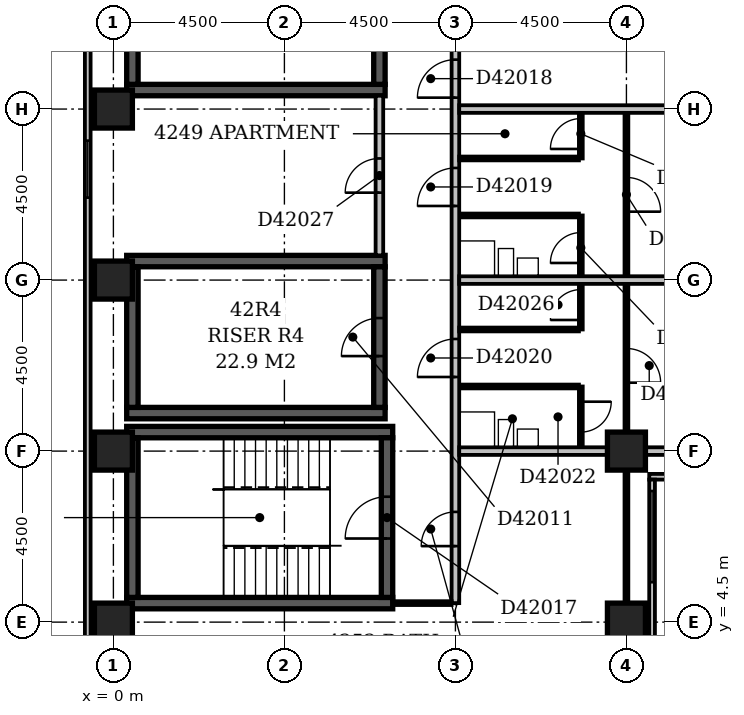
"""IFC4 building model, lengths in metres.
Left out: names, types, materials, properties, quantities, classifications, styles, units other than length and angle.
Written with IfcOpenShell. Run it as: python <this file> out.ifc"""

import sys

from ifc_helpers import new_model, si_unit, direction, frame, frame_2d, origin, origin_2d, place, context, subcontext, project, spatial, rectangle, extrude, element, fill, save


model = new_model("IFC4")
c1 = context("Model", 3, precision=1e-05, world=origin(), true_north=direction((0.0, 1.0)))
c2 = subcontext(c1, "Body", "Model", "MODEL_VIEW")
j1 = project(units=[si_unit("LENGTHUNIT", "METRE"), si_unit("PLANEANGLEUNIT", "RADIAN")], contexts=[c1])
p1 = place(None, origin())
s1 = spatial("IfcSite", under=j1, at=p1, CompositionType="ELEMENT")
p2 = place(p1, origin())
s2 = spatial("IfcBuilding", under=s1, at=p2, CompositionType="ELEMENT")
p3 = place(p2, frame((0.0, 0.0, 166.4)))
s3 = spatial("IfcBuildingStorey", under=s2, at=p3, CompositionType="ELEMENT", Elevation=166.4)
for number, where, z_axis, x_axis in (
    (1, (0.35, 5.0, -0.3), (0.0, 0.0, 1.0), (1.0, 0.0, 0.0)),
    (2, (0.35, 9.5, -0.3), (0.0, 0.0, 1.0), (1.0, 0.0, 0.0)),
):
    element("IfcWall", number, at=place(p3, frame(where, z_axis=z_axis, x_axis=x_axis)), inside=s3, PredefinedType="SHEAR", context=c2, shape_type="SweptSolid", body=[
        extrude(rectangle(XDim=7.0, YDim=0.3, at=frame_2d((3.5, 0.0))), origin(), (0.0, 0.0, 1.0), 3.6),
    ])
for number, where, z_axis, x_axis in (
    (3, (0.35, 10.0, -0.3), (0.0, 0.0, 1.0), (1.0, 0.0, 0.0)),
    (4, (0.35, 14.0, -0.3), (0.0, 0.0, 1.0), (1.0, 0.0, 0.0)),
    (5, (0.35, 18.5, -0.3), (0.0, 0.0, 1.0), (1.0, 0.0, 0.0)),
):
    element("IfcWall", number, at=place(p3, frame(where, z_axis=z_axis, x_axis=x_axis)), inside=s3, PredefinedType="SHEAR", context=c2, shape_type="SweptSolid", body=[
        extrude(rectangle(XDim=6.8, YDim=0.3, at=frame_2d((3.4, 0.0))), origin(), (0.0, 0.0, 1.0), 3.6),
    ])
p4 = place(p3, frame((0.5, 5.15, -0.3), z_axis=(0.0, 0.0, 1.0), x_axis=(0.0, 1.0, 0.0)))
e6 = element("IfcWall", 6, at=p4, inside=s3, PredefinedType="SHEAR", context=c2, shape_type="SweptSolid", body=[
    extrude(rectangle(XDim=4.2, YDim=0.3, at=frame_2d((2.1, 0.0))), origin(), (0.0, 0.0, 1.0), 3.6),
])
for number, where, z_axis, x_axis in (
    (7, (0.5, 10.15, -0.3), (0.0, 0.0, 1.0), (0.0, 1.0, 0.0)),
    (8, (0.5, 18.65, -0.3), (0.0, 0.0, 1.0), (0.0, 1.0, 0.0)),
):
    element("IfcWall", number, at=place(p3, frame(where, z_axis=z_axis, x_axis=x_axis)), inside=s3, PredefinedType="SHEAR", context=c2, shape_type="SweptSolid", body=[
        extrude(rectangle(XDim=3.7, YDim=0.3, at=frame_2d((1.85, 0.0))), origin(), (0.0, 0.0, 1.0), 3.6),
    ])
p5 = place(p3, frame((7.0, 10.15, -0.3), z_axis=(0.0, 0.0, 1.0), x_axis=(0.0, 1.0, 0.0)))
e9 = element("IfcWall", 9, at=p5, inside=s3, PredefinedType="SHEAR", context=c2, shape_type="SweptSolid", body=[
    extrude(rectangle(XDim=3.7, YDim=0.3, at=frame_2d((1.85, 0.0))), origin(), (0.0, 0.0, 1.0), 3.6),
])
p6 = place(p5, frame((1.35, 0.0, 0.3)))
e10 = element("IfcOpeningElement", 10, at=p6, cuts=e9, PredefinedType="OPENING", context=c2, shape_type="SweptSolid", body=[
    extrude(rectangle(XDim=1.0, YDim=2.1, at=frame_2d((0.5, 1.05))), frame((0.0, 0.162, 0.0), z_axis=(0.0, -1.0, 0.0), x_axis=(1.0, 0.0, 0.0)), (0.0, 0.0, 1.0), 0.324),
])
p7 = place(p3, frame((7.0, 18.65, -0.3), z_axis=(0.0, 0.0, 1.0), x_axis=(0.0, 1.0, 0.0)))
e11 = element("IfcWall", 11, at=p7, inside=s3, PredefinedType="SHEAR", context=c2, shape_type="SweptSolid", body=[
    extrude(rectangle(XDim=3.7, YDim=0.3, at=frame_2d((1.85, 0.0))), origin(), (0.0, 0.0, 1.0), 3.6),
])
p8 = place(p7, frame((1.35, 0.0, 0.3)))
e12 = element("IfcOpeningElement", 12, at=p8, cuts=e11, PredefinedType="OPENING", context=c2, shape_type="SweptSolid", body=[
    extrude(rectangle(XDim=1.0, YDim=2.1, at=frame_2d((0.5, 1.05))), frame((0.0, 0.162, 0.0), z_axis=(0.0, -1.0, 0.0), x_axis=(1.0, 0.0, 0.0)), (0.0, 0.0, 1.0), 0.324),
])
p9 = place(p3, frame((7.2, 5.15, -0.3), z_axis=(0.0, 0.0, 1.0), x_axis=(0.0, 1.0, 0.0)))
e13 = element("IfcWall", 13, at=p9, inside=s3, PredefinedType="SHEAR", context=c2, shape_type="SweptSolid", body=[
    extrude(rectangle(XDim=4.2, YDim=0.3, at=frame_2d((2.1, 0.0))), origin(), (0.0, 0.0, 1.0), 3.6),
])
p10 = place(p9, frame((1.55, 0.0, 0.3)))
e14 = element("IfcOpeningElement", 14, at=p10, cuts=e13, PredefinedType="OPENING", context=c2, shape_type="SweptSolid", body=[
    extrude(rectangle(XDim=1.1, YDim=2.1, at=frame_2d((0.55, 1.05))), frame((0.0, 0.162, 0.0), z_axis=(0.0, -1.0, 0.0), x_axis=(1.0, 0.0, 0.0)), (0.0, 0.0, 1.0), 0.324),
])
for number, where, z_axis, x_axis in (
    (15, (0.0, 4.5, -0.3), (0.0, 0.0, 1.0), (1.0, 0.0, 0.0)),
    (16, (13.5, 4.5, -0.3), (0.0, 0.0, 1.0), (1.0, 0.0, 0.0)),
    (17, (0.0, 9.0, -0.3), (0.0, 0.0, 1.0), (1.0, 0.0, 0.0)),
    (18, (13.5, 9.0, -0.3), (0.0, 0.0, 1.0), (1.0, 0.0, 0.0)),
    (19, (0.0, 13.5, -0.3), (0.0, 0.0, 1.0), (1.0, 0.0, 0.0)),
    (20, (0.0, 18.0, -0.3), (0.0, 0.0, 1.0), (1.0, 0.0, 0.0)),
):
    element("IfcColumn", number, at=place(p3, frame(where, z_axis=z_axis, x_axis=x_axis)), inside=s3, PredefinedType="COLUMN", context=c2, shape_type="SweptSolid", body=[
        extrude(rectangle(XDim=1.0, YDim=1.0, at=origin_2d()), origin(), (0.0, 0.0, 1.0), 3.6),
    ])
p11 = place(p3, frame((14.175, 3.9, 0.0), z_axis=(0.0, 0.0, 1.0), x_axis=(0.0, 1.0, 0.0)))
e21 = element("IfcWall", 21, at=p11, inside=s3, PredefinedType="STANDARD", context=c2, shape_type="SweptSolid", body=[
    extrude(rectangle(XDim=4.35, YDim=0.15, at=frame_2d((2.175, 0.0))), origin(), (0.0, 0.0, 1.0), 2.7),
])
p12 = place(p11, frame((1.65, 0.0, 0.6)))
e22 = element("IfcOpeningElement", 22, at=p12, cuts=e21, PredefinedType="OPENING", context=c2, shape_type="SweptSolid", body=[
    extrude(rectangle(XDim=2.4, YDim=1.8, at=frame_2d((1.2, 0.9))), frame((0.0, 0.087, 0.0), z_axis=(0.0, -1.0, 0.0), x_axis=(1.0, 0.0, 0.0)), (0.0, 0.0, 1.0), 0.174),
])
p13 = place(p3, frame((14.1, 8.325, 0.0), z_axis=(0.0, 0.0, 1.0), x_axis=(1.0, 0.0, 0.0)))
e23 = element("IfcWall", 23, at=p13, inside=s3, PredefinedType="STANDARD", context=c2, shape_type="SweptSolid", body=[
    extrude(rectangle(XDim=4.65, YDim=0.15, at=frame_2d((2.325, 0.0))), origin(), (0.0, 0.0, 1.0), 2.7),
])
p14 = place(p13, frame((0.45, 0.0, 0.6)))
e24 = element("IfcOpeningElement", 24, at=p14, cuts=e23, PredefinedType="OPENING", context=c2, shape_type="SweptSolid", body=[
    extrude(rectangle(XDim=2.4, YDim=1.8, at=frame_2d((1.2, 0.9))), frame((0.0, 0.087, 0.0), z_axis=(0.0, -1.0, 0.0), x_axis=(1.0, 0.0, 0.0)), (0.0, 0.0, 1.0), 0.174),
])
p15 = place(p3, frame((-0.675, 59.1, 0.0), z_axis=(0.0, 0.0, 1.0), x_axis=(0.0, -1.0, 0.0)))
e25 = element("IfcWall", 25, at=p15, inside=s3, PredefinedType="STANDARD", context=c2, shape_type="SweptSolid", body=[
    extrude(rectangle(XDim=55.35, YDim=0.15, at=frame_2d((27.675, 0.0))), origin(), (0.0, 0.0, 1.0), 2.7),
])
p16 = place(p15, frame((41.931, 0.0, 0.6)))
e26 = element("IfcOpeningElement", 26, at=p16, cuts=e25, PredefinedType="OPENING", context=c2, shape_type="SweptSolid", body=[
    extrude(rectangle(XDim=1.5, YDim=1.8, at=frame_2d((0.75, 0.9))), frame((0.0, 0.087, 0.0), z_axis=(0.0, -1.0, 0.0), x_axis=(1.0, 0.0, 0.0)), (0.0, 0.0, 1.0), 0.174),
])
p17 = place(p3, frame((0.0, 4.5, 0.0), z_axis=(0.0, 0.0, 1.0), x_axis=(0.0, 1.0, 0.0)))
e27 = element("IfcWall", 27, at=p17, inside=s3, PredefinedType="PARTITIONING", context=c2, shape_type="SweptSolid", body=[
    extrude(rectangle(XDim=0.5, YDim=0.1, at=frame_2d((0.25, 0.0))), origin(), (0.0, 0.0, 1.0), 2.7),
])
p18 = place(p3, frame((7.349, 5.0, 0.0), z_axis=(0.0, 0.0, 1.0), x_axis=(1.0, 0.0, 0.0)))
e28 = element("IfcWall", 28, at=p18, inside=s3, PredefinedType="PARTITIONING", context=c2, shape_type="SweptSolid", body=[
    extrude(rectangle(XDim=1.551, YDim=0.1, at=frame_2d((0.775, 0.0))), origin(), (0.0, 0.0, 1.0), 3.3),
])
p19 = place(p3, frame((9.0, 5.0, 0.0), z_axis=(0.0, 0.0, 1.0), x_axis=(0.0, 1.0, 0.0)))
e29 = element("IfcWall", 29, at=p19, inside=s3, PredefinedType="PARTITIONING", context=c2, shape_type="SweptSolid", body=[
    extrude(rectangle(XDim=27.75, YDim=0.2, at=frame_2d((13.875, 0.0))), origin(), (0.0, 0.0, 1.0), 3.3),
])
p20 = place(p19, frame((13.3, 0.0, 0.0)))
e30 = element("IfcOpeningElement", 30, at=p20, cuts=e29, PredefinedType="OPENING", context=c2, shape_type="SweptSolid", body=[
    extrude(rectangle(XDim=1.0, YDim=2.1, at=frame_2d((0.5, 1.05))), frame((0.0, 0.112, 0.0), z_axis=(0.0, -1.0, 0.0), x_axis=(1.0, 0.0, 0.0)), (0.0, 0.0, 1.0), 0.224),
])
p21 = place(p19, frame((10.45, 0.0, 0.0)))
e31 = element("IfcOpeningElement", 31, at=p21, cuts=e29, PredefinedType="OPENING", context=c2, shape_type="SweptSolid", body=[
    extrude(rectangle(XDim=1.0, YDim=2.1, at=frame_2d((0.5, 1.05))), frame((0.0, 0.112, 0.0), z_axis=(0.0, -1.0, 0.0), x_axis=(1.0, 0.0, 0.0)), (0.0, 0.0, 1.0), 0.224),
])
p22 = place(p19, frame((5.95, 0.0, 0.0)))
e32 = element("IfcOpeningElement", 32, at=p22, cuts=e29, PredefinedType="OPENING", context=c2, shape_type="SweptSolid", body=[
    extrude(rectangle(XDim=1.0, YDim=2.1, at=frame_2d((0.5, 1.05))), frame((0.0, 0.112, 0.0), z_axis=(0.0, -1.0, 0.0), x_axis=(1.0, 0.0, 0.0)), (0.0, 0.0, 1.0), 0.224),
])
p23 = place(p19, frame((1.5, 0.0, 0.0)))
e33 = element("IfcOpeningElement", 33, at=p23, cuts=e29, PredefinedType="OPENING", context=c2, shape_type="SweptSolid", body=[
    extrude(rectangle(XDim=0.9, YDim=2.1, at=frame_2d((0.45, 1.05))), frame((0.0, 0.112, 0.0), z_axis=(0.0, -1.0, 0.0), x_axis=(1.0, 0.0, 0.0)), (0.0, 0.0, 1.0), 0.224),
])
p24 = place(p3, frame((13.5, 5.0, 0.0), z_axis=(0.0, 0.0, 1.0), x_axis=(0.0, 1.0, 0.0)))
e34 = element("IfcWall", 34, at=p24, inside=s3, PredefinedType="PARTITIONING", context=c2, shape_type="SweptSolid", body=[
    extrude(rectangle(XDim=3.5, YDim=0.1, at=frame_2d((1.75, 0.0))), origin(), (0.0, 0.0, 1.0), 2.7),
])
p25 = place(p3, frame((9.1, 9.0, 0.0), z_axis=(0.0, 0.0, 1.0), x_axis=(1.0, 0.0, 0.0)))
e35 = element("IfcWall", 35, at=p25, inside=s3, PredefinedType="PARTITIONING", context=c2, shape_type="SweptSolid", body=[
    extrude(rectangle(XDim=3.9, YDim=0.2, at=frame_2d((1.95, 0.0))), origin(), (0.0, 0.0, 1.0), 3.3),
])
p26 = place(p3, frame((14.0, 9.0, 0.0), z_axis=(0.0, 0.0, 1.0), x_axis=(1.0, 0.0, 0.0)))
e36 = element("IfcWall", 36, at=p26, inside=s3, PredefinedType="PARTITIONING", context=c2, shape_type="SweptSolid", body=[
    extrude(rectangle(XDim=3.5, YDim=0.2, at=frame_2d((1.75, 0.0))), origin(), (0.0, 0.0, 1.0), 2.7),
])
p27 = place(p3, frame((12.3, 9.1, 0.0), z_axis=(0.0, 0.0, 1.0), x_axis=(0.0, 1.0, 0.0)))
e37 = element("IfcWall", 37, at=p27, inside=s3, PredefinedType="PARTITIONING", context=c2, shape_type="SweptSolid", body=[
    extrude(rectangle(XDim=1.6, YDim=0.1, at=frame_2d((0.8, 0.0))), origin(), (0.0, 0.0, 1.0), 3.3),
])
p28 = place(p27, frame((0.4, 0.0, 0.0)))
e38 = element("IfcOpeningElement", 38, at=p28, cuts=e37, PredefinedType="OPENING", context=c2, shape_type="SweptSolid", body=[
    extrude(rectangle(XDim=0.8, YDim=2.1, at=frame_2d((0.4, 1.05))), frame((0.0, 0.062, 0.0), z_axis=(0.0, -1.0, 0.0), x_axis=(1.0, 0.0, 0.0)), (0.0, 0.0, 1.0), 0.124),
])
p29 = place(p3, frame((13.5, 9.5, 0.0), z_axis=(0.0, 0.0, 1.0), x_axis=(0.0, 1.0, 0.0)))
e39 = element("IfcWall", 39, at=p29, inside=s3, PredefinedType="PARTITIONING", context=c2, shape_type="SweptSolid", body=[
    extrude(rectangle(XDim=8.4, YDim=0.1, at=frame_2d((4.2, 0.0))), origin(), (0.0, 0.0, 1.0), 3.3),
])
p30 = place(p29, frame((5.8, 0.0, 0.0)))
e40 = element("IfcOpeningElement", 40, at=p30, cuts=e39, PredefinedType="OPENING", context=c2, shape_type="SweptSolid", body=[
    extrude(rectangle(XDim=0.9, YDim=2.1, at=frame_2d((0.45, 1.05))), frame((0.0, 0.062, 0.0), z_axis=(0.0, -1.0, 0.0), x_axis=(1.0, 0.0, 0.0)), (0.0, 0.0, 1.0), 0.124),
])
p31 = place(p29, frame((1.3, 0.0, 0.0)))
e41 = element("IfcOpeningElement", 41, at=p31, cuts=e39, PredefinedType="OPENING", context=c2, shape_type="SweptSolid", body=[
    extrude(rectangle(XDim=0.9, YDim=2.1, at=frame_2d((0.45, 1.05))), frame((0.0, 0.062, 0.0), z_axis=(0.0, -1.0, 0.0), x_axis=(1.0, 0.0, 0.0)), (0.0, 0.0, 1.0), 0.124),
])
p32 = place(p3, frame((9.1, 10.7, 0.0), z_axis=(0.0, 0.0, 1.0), x_axis=(1.0, 0.0, 0.0)))
e42 = element("IfcWall", 42, at=p32, inside=s3, PredefinedType="PLUMBINGWALL", context=c2, shape_type="SweptSolid", body=[
    extrude(rectangle(XDim=3.15, YDim=0.1, at=frame_2d((1.575, 0.0))), origin(), (0.0, 0.0, 1.0), 3.3),
])
p33 = place(p3, frame((9.1, 12.2, 0.0), z_axis=(0.0, 0.0, 1.0), x_axis=(1.0, 0.0, 0.0)))
e43 = element("IfcWall", 43, at=p33, inside=s3, PredefinedType="PARTITIONING", context=c2, shape_type="SweptSolid", body=[
    extrude(rectangle(XDim=3.15, YDim=0.1, at=frame_2d((1.575, 0.0))), origin(), (0.0, 0.0, 1.0), 3.3),
])
p34 = place(p3, frame((12.3, 12.2, 0.0), z_axis=(0.0, 0.0, 1.0), x_axis=(0.0, 1.0, 0.0)))
e44 = element("IfcWall", 44, at=p34, inside=s3, PredefinedType="PARTITIONING", context=c2, shape_type="SweptSolid", body=[
    extrude(rectangle(XDim=3.0, YDim=0.1, at=frame_2d((1.5, 0.0))), origin(), (0.0, 0.0, 1.0), 3.3),
])
p35 = place(p34, frame((1.75, 0.0, 0.0)))
e45 = element("IfcOpeningElement", 45, at=p35, cuts=e44, PredefinedType="OPENING", context=c2, shape_type="SweptSolid", body=[
    extrude(rectangle(XDim=0.8, YDim=2.1, at=frame_2d((0.4, 1.05))), frame((0.0, 0.062, 0.0), z_axis=(0.0, -1.0, 0.0), x_axis=(1.0, 0.0, 0.0)), (0.0, 0.0, 1.0), 0.124),
])
p36 = place(p34, frame((0.25, 0.0, 0.0)))
e46 = element("IfcOpeningElement", 46, at=p36, cuts=e44, PredefinedType="OPENING", context=c2, shape_type="SweptSolid", body=[
    extrude(rectangle(XDim=0.8, YDim=2.1, at=frame_2d((0.4, 1.05))), frame((0.0, 0.062, 0.0), z_axis=(0.0, -1.0, 0.0), x_axis=(1.0, 0.0, 0.0)), (0.0, 0.0, 1.0), 0.124),
])
p37 = place(p3, frame((9.1, 13.5, 0.0), z_axis=(0.0, 0.0, 1.0), x_axis=(1.0, 0.0, 0.0)))
e47 = element("IfcWall", 47, at=p37, inside=s3, PredefinedType="PARTITIONING", context=c2, shape_type="SweptSolid", body=[
    extrude(rectangle(XDim=8.4, YDim=0.2, at=frame_2d((4.2, 0.0))), origin(), (0.0, 0.0, 1.0), 3.3),
])
p38 = place(p3, frame((7.0, 14.15, 0.0), z_axis=(0.0, 0.0, 1.0), x_axis=(0.0, 1.0, 0.0)))
e48 = element("IfcWall", 48, at=p38, inside=s3, PredefinedType="PARTITIONING", context=c2, shape_type="SweptSolid", body=[
    extrude(rectangle(XDim=4.2, YDim=0.2, at=frame_2d((2.1, 0.0))), origin(), (0.0, 0.0, 1.0), 3.3),
])
p39 = place(p38, frame((1.65, 0.0, 0.0)))
e49 = element("IfcOpeningElement", 49, at=p39, cuts=e48, PredefinedType="OPENING", context=c2, shape_type="SweptSolid", body=[
    extrude(rectangle(XDim=0.9, YDim=2.1, at=frame_2d((0.45, 1.05))), frame((0.0, 0.112, 0.0), z_axis=(0.0, -1.0, 0.0), x_axis=(1.0, 0.0, 0.0)), (0.0, 0.0, 1.0), 0.224),
])
p40 = place(p3, frame((9.1, 15.2, 0.0), z_axis=(0.0, 0.0, 1.0), x_axis=(1.0, 0.0, 0.0)))
e50 = element("IfcWall", 50, at=p40, inside=s3, PredefinedType="PLUMBINGWALL", context=c2, shape_type="SweptSolid", body=[
    extrude(rectangle(XDim=3.15, YDim=0.1, at=frame_2d((1.575, 0.0))), origin(), (0.0, 0.0, 1.0), 3.3),
])
p41 = place(p3, frame((9.1, 16.7, 0.0), z_axis=(0.0, 0.0, 1.0), x_axis=(1.0, 0.0, 0.0)))
e51 = element("IfcWall", 51, at=p41, inside=s3, PredefinedType="PARTITIONING", context=c2, shape_type="SweptSolid", body=[
    extrude(rectangle(XDim=3.15, YDim=0.1, at=frame_2d((1.575, 0.0))), origin(), (0.0, 0.0, 1.0), 3.3),
])
p42 = place(p3, frame((12.3, 16.7, 0.0), z_axis=(0.0, 0.0, 1.0), x_axis=(0.0, 1.0, 0.0)))
e52 = element("IfcWall", 52, at=p42, inside=s3, PredefinedType="PARTITIONING", context=c2, shape_type="SweptSolid", body=[
    extrude(rectangle(XDim=1.2, YDim=0.1, at=frame_2d((0.6, 0.0))), origin(), (0.0, 0.0, 1.0), 3.3),
])
p43 = place(p42, frame((0.25, 0.0, 0.0)))
e53 = element("IfcOpeningElement", 53, at=p43, cuts=e52, PredefinedType="OPENING", context=c2, shape_type="SweptSolid", body=[
    extrude(rectangle(XDim=0.8, YDim=2.1, at=frame_2d((0.4, 1.05))), frame((0.0, 0.062, 0.0), z_axis=(0.0, -1.0, 0.0), x_axis=(1.0, 0.0, 0.0)), (0.0, 0.0, 1.0), 0.124),
])
p44 = place(p3, frame((9.1, 18.0, 0.0), z_axis=(0.0, 0.0, 1.0), x_axis=(1.0, 0.0, 0.0)))
e54 = element("IfcWall", 54, at=p44, inside=s3, PredefinedType="PARTITIONING", context=c2, shape_type="SweptSolid", body=[
    extrude(rectangle(XDim=8.4, YDim=0.2, at=frame_2d((4.2, 0.0))), origin(), (0.0, 0.0, 1.0), 2.6),
])
p45 = place(p12, origin())
e55 = element("IfcWindow", 55, at=p45, inside=s3, PartitioningType="SINGLE_PANEL", PredefinedType="WINDOW", context=c2, shape_type="SweptSolid", body=[
    extrude(rectangle(XDim=2.4, YDim=1.8, at=frame_2d((1.2, 0.9))), frame((0.0, 0.03, 0.0), z_axis=(0.0, -1.0, 0.0), x_axis=(1.0, 0.0, 0.0)), (0.0, 0.0, 1.0), 0.06),
])
fill(e22, e55)
p46 = place(p16, origin())
e56 = element("IfcWindow", 56, at=p46, inside=s3, PartitioningType="SINGLE_PANEL", PredefinedType="WINDOW", context=c2, shape_type="SweptSolid", body=[
    extrude(rectangle(XDim=1.5, YDim=1.8, at=frame_2d((0.75, 0.9))), frame((0.0, 0.03, 0.0), z_axis=(0.0, -1.0, 0.0), x_axis=(1.0, 0.0, 0.0)), (0.0, 0.0, 1.0), 0.06),
])
fill(e26, e56)
p47 = place(p6, origin())
e57 = element("IfcDoor", 57, at=p47, inside=s3, OperationType="SINGLE_SWING_LEFT", PredefinedType="DOOR", context=c2, shape_type="SweptSolid", body=[
    extrude(rectangle(XDim=1.0, YDim=2.1, at=frame_2d((0.5, 1.05))), frame((0.0, 0.025, 0.0), z_axis=(0.0, -1.0, 0.0), x_axis=(1.0, 0.0, 0.0)), (0.0, 0.0, 1.0), 0.05),
])
fill(e10, e57)
p48 = place(p10, origin())
e58 = element("IfcDoor", 58, at=p48, inside=s3, OperationType="SINGLE_SWING_LEFT", PredefinedType="DOOR", context=c2, shape_type="SweptSolid", body=[
    extrude(rectangle(XDim=1.1, YDim=2.1, at=frame_2d((0.55, 1.05))), frame((0.0, 0.025, 0.0), z_axis=(0.0, -1.0, 0.0), x_axis=(1.0, 0.0, 0.0)), (0.0, 0.0, 1.0), 0.05),
])
fill(e14, e58)
p49 = place(p20, origin())
e59 = element("IfcDoor", 59, at=p49, inside=s3, OperationType="SINGLE_SWING_LEFT", PredefinedType="DOOR", context=c2, shape_type="SweptSolid", body=[
    extrude(rectangle(XDim=1.0, YDim=2.1, at=frame_2d((0.5, 1.05))), frame((0.0, 0.025, 0.0), z_axis=(0.0, -1.0, 0.0), x_axis=(1.0, 0.0, 0.0)), (0.0, 0.0, 1.0), 0.05),
])
fill(e30, e59)
p50 = place(p21, origin())
e60 = element("IfcDoor", 60, at=p50, inside=s3, OperationType="SINGLE_SWING_LEFT", PredefinedType="DOOR", context=c2, shape_type="SweptSolid", body=[
    extrude(rectangle(XDim=1.0, YDim=2.1, at=frame_2d((0.5, 1.05))), frame((0.0, 0.025, 0.0), z_axis=(0.0, -1.0, 0.0), x_axis=(1.0, 0.0, 0.0)), (0.0, 0.0, 1.0), 0.05),
])
fill(e31, e60)
p51 = place(p22, origin())
e61 = element("IfcDoor", 61, at=p51, inside=s3, OperationType="SINGLE_SWING_LEFT", PredefinedType="DOOR", context=c2, shape_type="SweptSolid", body=[
    extrude(rectangle(XDim=1.0, YDim=2.1, at=frame_2d((0.5, 1.05))), frame((0.0, 0.025, 0.0), z_axis=(0.0, -1.0, 0.0), x_axis=(1.0, 0.0, 0.0)), (0.0, 0.0, 1.0), 0.05),
])
fill(e32, e61)
p52 = place(p23, origin())
e62 = element("IfcDoor", 62, at=p52, inside=s3, OperationType="SINGLE_SWING_LEFT", PredefinedType="DOOR", context=c2, shape_type="SweptSolid", body=[
    extrude(rectangle(XDim=0.9, YDim=2.1, at=frame_2d((0.45, 1.05))), frame((0.0, 0.025, 0.0), z_axis=(0.0, -1.0, 0.0), x_axis=(1.0, 0.0, 0.0)), (0.0, 0.0, 1.0), 0.05),
])
fill(e33, e62)
p53 = place(p28, origin())
e63 = element("IfcDoor", 63, at=p53, inside=s3, OperationType="SINGLE_SWING_RIGHT", PredefinedType="DOOR", context=c2, shape_type="SweptSolid", body=[
    extrude(rectangle(XDim=0.8, YDim=2.1, at=frame_2d((0.4, 1.05))), frame((0.0, 0.025, 0.0), z_axis=(0.0, -1.0, 0.0), x_axis=(1.0, 0.0, 0.0)), (0.0, 0.0, 1.0), 0.05),
])
fill(e38, e63)
p54 = place(p30, frame((0.9, 0.0, 0.0), z_axis=(0.0, 0.0, 1.0), x_axis=(-1.0, 0.0, 0.0)))
e64 = element("IfcDoor", 64, at=p54, inside=s3, OperationType="SINGLE_SWING_RIGHT", PredefinedType="DOOR", context=c2, shape_type="SweptSolid", body=[
    extrude(rectangle(XDim=0.9, YDim=2.1, at=frame_2d((0.45, 1.05))), frame((0.0, 0.025, 0.0), z_axis=(0.0, -1.0, 0.0), x_axis=(1.0, 0.0, 0.0)), (0.0, 0.0, 1.0), 0.05),
])
fill(e40, e64)
p55 = place(p31, frame((0.9, 0.0, 0.0), z_axis=(0.0, 0.0, 1.0), x_axis=(-1.0, 0.0, 0.0)))
e65 = element("IfcDoor", 65, at=p55, inside=s3, OperationType="SINGLE_SWING_RIGHT", PredefinedType="DOOR", context=c2, shape_type="SweptSolid", body=[
    extrude(rectangle(XDim=0.9, YDim=2.1, at=frame_2d((0.45, 1.05))), frame((0.0, 0.025, 0.0), z_axis=(0.0, -1.0, 0.0), x_axis=(1.0, 0.0, 0.0)), (0.0, 0.0, 1.0), 0.05),
])
fill(e41, e65)
p56 = place(p35, origin())
e66 = element("IfcDoor", 66, at=p56, inside=s3, OperationType="SINGLE_SWING_LEFT", PredefinedType="DOOR", context=c2, shape_type="SweptSolid", body=[
    extrude(rectangle(XDim=0.8, YDim=2.1, at=frame_2d((0.4, 1.05))), frame((0.0, 0.025, 0.0), z_axis=(0.0, -1.0, 0.0), x_axis=(1.0, 0.0, 0.0)), (0.0, 0.0, 1.0), 0.05),
])
fill(e45, e66)
p57 = place(p36, origin())
e67 = element("IfcDoor", 67, at=p57, inside=s3, OperationType="SINGLE_SWING_LEFT", PredefinedType="DOOR", context=c2, shape_type="SweptSolid", body=[
    extrude(rectangle(XDim=0.8, YDim=2.1, at=frame_2d((0.4, 1.05))), frame((0.0, 0.025, 0.0), z_axis=(0.0, -1.0, 0.0), x_axis=(1.0, 0.0, 0.0)), (0.0, 0.0, 1.0), 0.05),
])
fill(e46, e67)
p58 = place(p39, origin())
e68 = element("IfcDoor", 68, at=p58, inside=s3, OperationType="SINGLE_SWING_LEFT", PredefinedType="DOOR", context=c2, shape_type="SweptSolid", body=[
    extrude(rectangle(XDim=0.9, YDim=2.1, at=frame_2d((0.45, 1.05))), frame((0.0, 0.025, 0.0), z_axis=(0.0, -1.0, 0.0), x_axis=(1.0, 0.0, 0.0)), (0.0, 0.0, 1.0), 0.05),
])
fill(e49, e68)
p59 = place(p43, origin())
e69 = element("IfcDoor", 69, at=p59, inside=s3, OperationType="SINGLE_SWING_LEFT", PredefinedType="DOOR", context=c2, shape_type="SweptSolid", body=[
    extrude(rectangle(XDim=0.8, YDim=2.1, at=frame_2d((0.4, 1.05))), frame((0.0, 0.025, 0.0), z_axis=(0.0, -1.0, 0.0), x_axis=(1.0, 0.0, 0.0)), (0.0, 0.0, 1.0), 0.05),
])
fill(e53, e69)
save(model, sys.argv[1])
